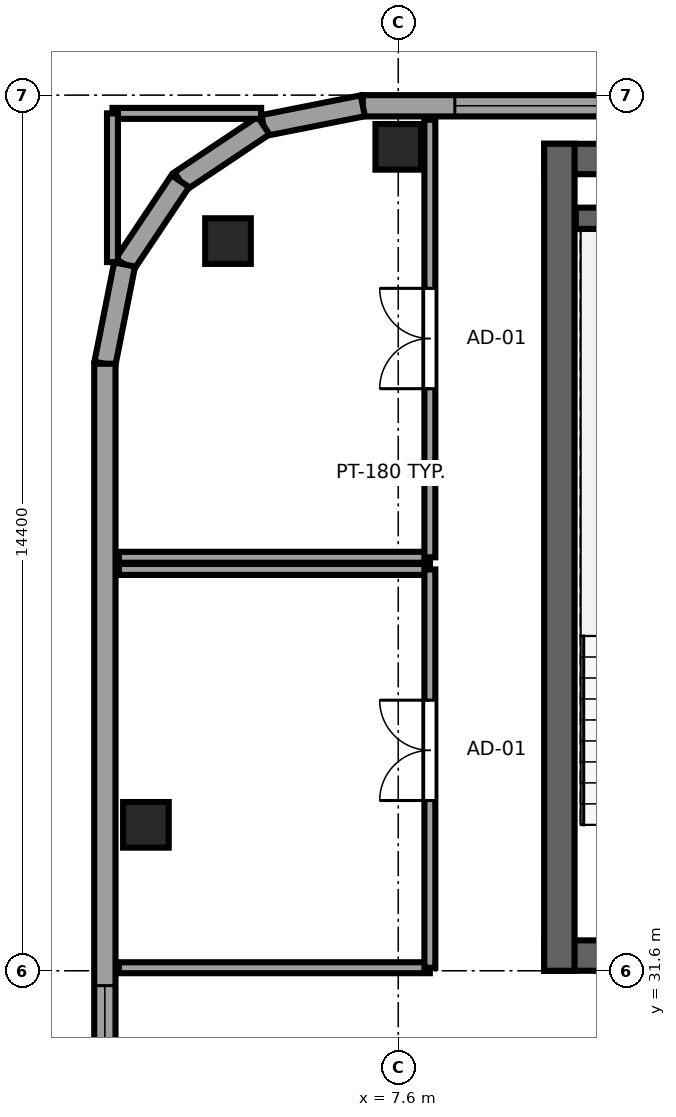
"""IFC4 building model, lengths in metres.
Left out: names, types, materials, properties, quantities, classifications, styles, units other than length and angle.
Written with IfcOpenShell. Run it as: python <this file> out.ifc"""

import sys

from ifc_helpers import new_model, si_unit, direction, frame, frame_2d, origin, origin_2d, place, context, subcontext, project, spatial, rectangle, extrude, source, transform, mapped, element, fill, save


model = new_model("IFC4")
c1 = context("Model", 3, precision=1e-05, world=origin(), true_north=direction((0.0, 1.0)))
c2 = subcontext(c1, "Body", "Model", "MODEL_VIEW")
j1 = project(units=[si_unit("LENGTHUNIT", "METRE"), si_unit("PLANEANGLEUNIT", "RADIAN")], contexts=[c1])
p1 = place(None, origin())
s1 = spatial("IfcSite", under=j1, at=p1, CompositionType="ELEMENT")
p2 = place(p1, origin())
s2 = spatial("IfcBuilding", under=s1, at=p2, CompositionType="ELEMENT")
p3 = place(p2, frame((0.0, 0.0, 216.8)))
s3 = spatial("IfcBuildingStorey", under=s2, at=p3, CompositionType="ELEMENT", Elevation=216.8)
p4 = place(p3, frame((10.0, 31.85, 0.0), z_axis=(0.0, 0.0, 1.0), x_axis=(1.0, 0.0, 0.0)))
e1 = element("IfcWall", 1, at=p4, inside=s3, PredefinedType="SHEAR", context=c2, shape_type="SweptSolid", body=[
    extrude(rectangle(XDim=26.0, YDim=0.5, at=frame_2d((13.0, 0.0))), origin(), (0.0, 0.0, 1.0), 3.55),
])
p5 = place(p4, frame((7.45, 0.0, 0.0), z_axis=(0.0, 0.0, 1.0), x_axis=(-1.0, 0.0, 0.0)))
e2 = element("IfcOpeningElement", 2, at=p5, cuts=e1, PredefinedType="OPENING", context=c2, shape_type="SweptSolid", body=[
    extrude(rectangle(XDim=1.5, YDim=2.04, at=frame_2d((0.75, 1.02))), frame((0.0, 0.26, 0.0), z_axis=(0.0, -1.0, 0.0), x_axis=(1.0, 0.0, 0.0)), (0.0, 0.0, 1.0), 0.52),
])
p6 = place(p4, frame((13.75, 0.0, 0.0), z_axis=(0.0, 0.0, 1.0), x_axis=(-1.0, 0.0, 0.0)))
e3 = element("IfcOpeningElement", 3, at=p6, cuts=e1, PredefinedType="OPENING", context=c2, shape_type="SweptSolid", body=[
    extrude(rectangle(XDim=1.5, YDim=2.04, at=frame_2d((0.75, 1.02))), frame((0.0, 0.26, 0.0), z_axis=(0.0, -1.0, 0.0), x_axis=(1.0, 0.0, 0.0)), (0.0, 0.0, 1.0), 0.52),
])
p7 = place(p4, frame((20.05, 0.0, 0.0), z_axis=(0.0, 0.0, 1.0), x_axis=(-1.0, 0.0, 0.0)))
e4 = element("IfcOpeningElement", 4, at=p7, cuts=e1, PredefinedType="OPENING", context=c2, shape_type="SweptSolid", body=[
    extrude(rectangle(XDim=1.5, YDim=2.04, at=frame_2d((0.75, 1.02))), frame((0.0, 0.26, 0.0), z_axis=(0.0, -1.0, 0.0), x_axis=(1.0, 0.0, 0.0)), (0.0, 0.0, 1.0), 0.52),
])
p8 = place(p3, frame((10.0, 44.95, 0.0), z_axis=(0.0, 0.0, 1.0), x_axis=(1.0, 0.0, 0.0)))
e5 = element("IfcWall", 5, at=p8, inside=s3, PredefinedType="SHEAR", context=c2, shape_type="SweptSolid", body=[
    extrude(rectangle(XDim=26.0, YDim=0.5, at=frame_2d((13.0, 0.0))), origin(), (0.0, 0.0, 1.0), 3.55),
])
p9 = place(p3, frame((10.25, 31.6, 0.0), z_axis=(0.0, 0.0, 1.0), x_axis=(0.0, 1.0, 0.0)))
e6 = element("IfcWall", 6, at=p9, inside=s3, PredefinedType="SHEAR", context=c2, shape_type="SweptSolid", body=[
    extrude(rectangle(XDim=13.6, YDim=0.5, at=frame_2d((6.8, 0.0))), origin(), (0.0, 0.0, 1.0), 3.55),
])
p10 = place(p3, frame((10.52, 43.975, 0.0), z_axis=(0.0, 0.0, 1.0), x_axis=(1.0, 0.0, 0.0)))
e7 = element("IfcWall", 7, at=p10, inside=s3, PredefinedType="SHEAR", context=c2, shape_type="SweptSolid", body=[
    extrude(rectangle(XDim=3.6, YDim=0.35, at=frame_2d((1.8, 0.0))), origin(), (0.0, 0.0, 1.0), 3.55),
])
m1 = source(origin(), c2, "Body", "SweptSolid", [
    extrude(rectangle(XDim=0.75, YDim=0.75, at=origin_2d()), origin(), (0.0, 0.0, 1.0), 3.55),
])
for number, where, z_axis, x_axis in (
    (8, (4.8, 43.6, 0.0), (0.0, 0.0, 1.0), (1.0, 0.0, 0.0)),
    (9, (7.6, 45.15, 0.0), (0.0, 0.0, 1.0), (1.0, 0.0, 0.0)),
    (10, (3.45, 34.0, 0.0), (0.0, 0.0, 1.0), (1.0, 0.0, 0.0)),
):
    element("IfcColumn", number, at=place(p3, frame(where, z_axis=z_axis, x_axis=x_axis)), inside=s3, PredefinedType="COLUMN", context=c2, shape_type="MappedRepresentation", body=[
        mapped(m1, transform((0.0, 0.0, 0.0), x_axis=(1.0, 0.0, 0.0), y_axis=(0.0, 1.0, 0.0), z_axis=(0.0, 0.0, 1.0), scale=1.0)),
    ])
p11 = place(p3, frame((35.383, 45.825, 0.0), z_axis=(0.0, 0.0, 1.0), x_axis=(-1.0, 0.0, 0.0)))
e11 = element("IfcWall", 11, at=p11, inside=s3, PredefinedType="SOLIDWALL", context=c2, shape_type="SweptSolid", body=[
    extrude(rectangle(XDim=28.366, YDim=0.35, at=frame_2d((14.183, 0.0))), origin(), (0.0, 0.0, 1.0), 3.37),
])
p12 = place(p11, frame((1.514, 0.0, 0.68)))
e12 = element("IfcOpeningElement", 12, at=p12, cuts=e11, PredefinedType="OPENING", context=c2, shape_type="SweptSolid", body=[
    extrude(rectangle(XDim=2.7, YDim=1.95, at=frame_2d((1.35, 0.975))), frame((0.0, 0.185, 0.0), z_axis=(0.0, -1.0, 0.0), x_axis=(1.0, 0.0, 0.0)), (0.0, 0.0, 1.0), 0.37),
])
p13 = place(p11, frame((6.041, 0.0, 0.68)))
e13 = element("IfcOpeningElement", 13, at=p13, cuts=e11, PredefinedType="OPENING", context=c2, shape_type="SweptSolid", body=[
    extrude(rectangle(XDim=2.7, YDim=1.95, at=frame_2d((1.35, 0.975))), frame((0.0, 0.185, 0.0), z_axis=(0.0, -1.0, 0.0), x_axis=(1.0, 0.0, 0.0)), (0.0, 0.0, 1.0), 0.37),
])
p14 = place(p11, frame((10.569, 0.0, 0.68)))
e14 = element("IfcOpeningElement", 14, at=p14, cuts=e11, PredefinedType="OPENING", context=c2, shape_type="SweptSolid", body=[
    extrude(rectangle(XDim=2.7, YDim=1.95, at=frame_2d((1.35, 0.975))), frame((0.0, 0.185, 0.0), z_axis=(0.0, -1.0, 0.0), x_axis=(1.0, 0.0, 0.0)), (0.0, 0.0, 1.0), 0.37),
])
p15 = place(p11, frame((15.097, 0.0, 0.68)))
e15 = element("IfcOpeningElement", 15, at=p15, cuts=e11, PredefinedType="OPENING", context=c2, shape_type="SweptSolid", body=[
    extrude(rectangle(XDim=2.7, YDim=1.95, at=frame_2d((1.35, 0.975))), frame((0.0, 0.185, 0.0), z_axis=(0.0, -1.0, 0.0), x_axis=(1.0, 0.0, 0.0)), (0.0, 0.0, 1.0), 0.37),
])
p16 = place(p11, frame((19.624, 0.0, 0.68)))
e16 = element("IfcOpeningElement", 16, at=p16, cuts=e11, PredefinedType="OPENING", context=c2, shape_type="SweptSolid", body=[
    extrude(rectangle(XDim=2.7, YDim=1.95, at=frame_2d((1.35, 0.975))), frame((0.0, 0.185, 0.0), z_axis=(0.0, -1.0, 0.0), x_axis=(1.0, 0.0, 0.0)), (0.0, 0.0, 1.0), 0.37),
])
p17 = place(p11, frame((24.152, 0.0, 0.68)))
e17 = element("IfcOpeningElement", 17, at=p17, cuts=e11, PredefinedType="OPENING", context=c2, shape_type="SweptSolid", body=[
    extrude(rectangle(XDim=2.7, YDim=1.95, at=frame_2d((1.35, 0.975))), frame((0.0, 0.185, 0.0), z_axis=(0.0, -1.0, 0.0), x_axis=(1.0, 0.0, 0.0)), (0.0, 0.0, 1.0), 0.37),
])
p18 = place(p3, frame((7.017, 45.825, 0.0), z_axis=(0.0, 0.0, 1.0), x_axis=(-0.980788844421, -0.195072403631, 0.0)))
e18 = element("IfcWall", 18, at=p18, inside=s3, PredefinedType="SOLIDWALL", context=c2, shape_type="SweptSolid", body=[
    extrude(rectangle(XDim=1.665, YDim=0.35, at=frame_2d((0.832, 0.0))), origin(), (0.0, 0.0, 1.0), 3.37),
])
for number, where, z_axis, x_axis in (
    (19, (5.385, 45.5, 0.0), (0.0, 0.0, 1.0), (-0.832, -0.556, 0.0)),
    (20, (4.015, 44.585, 0.0), (0.0, 0.0, 1.0), (-0.556, -0.831, 0.0)),
):
    element("IfcWall", number, at=place(p3, frame(where, z_axis=z_axis, x_axis=x_axis)), inside=s3, PredefinedType="SOLIDWALL", context=c2, shape_type="SweptSolid", body=[
        extrude(rectangle(XDim=1.647, YDim=0.35, at=frame_2d((0.824, 0.0))), origin(), (0.0, 0.0, 1.0), 2.9),
    ])
p19 = place(p3, frame((3.1, 43.216, 0.0), z_axis=(0.0, 0.0, 1.0), x_axis=(-0.195044345786, -0.980794424524, 0.0)))
e21 = element("IfcWall", 21, at=p19, inside=s3, PredefinedType="SOLIDWALL", context=c2, shape_type="SweptSolid", body=[
    extrude(rectangle(XDim=1.665, YDim=0.35, at=frame_2d((0.833, 0.0))), origin(), (0.0, 0.0, 1.0), 3.37),
])
p20 = place(p3, frame((2.775, 41.583, 0.0), z_axis=(0.0, 0.0, 1.0), x_axis=(0.0, -1.0, 0.0)))
e22 = element("IfcWall", 22, at=p20, inside=s3, PredefinedType="SOLIDWALL", context=c2, shape_type="SweptSolid", body=[
    extrude(rectangle(XDim=34.566, YDim=0.35, at=frame_2d((17.283, 0.0))), origin(), (0.0, 0.0, 1.0), 3.37),
])
p21 = place(p20, frame((10.227, 0.0, 0.68)))
e23 = element("IfcOpeningElement", 23, at=p21, cuts=e22, PredefinedType="OPENING", context=c2, shape_type="SweptSolid", body=[
    extrude(rectangle(XDim=2.7, YDim=1.95, at=frame_2d((1.35, 0.975))), frame((0.0, 0.185, 0.0), z_axis=(0.0, -1.0, 0.0), x_axis=(1.0, 0.0, 0.0)), (0.0, 0.0, 1.0), 0.37),
])
p22 = place(p20, frame((22.189, 0.0, 0.68)))
e24 = element("IfcOpeningElement", 24, at=p22, cuts=e22, PredefinedType="OPENING", context=c2, shape_type="SweptSolid", body=[
    extrude(rectangle(XDim=2.7, YDim=1.95, at=frame_2d((1.35, 0.975))), frame((0.0, 0.185, 0.0), z_axis=(0.0, -1.0, 0.0), x_axis=(1.0, 0.0, 0.0)), (0.0, 0.0, 1.0), 0.37),
])
p23 = place(p20, frame((26.36, 0.0, 0.68)))
e25 = element("IfcOpeningElement", 25, at=p23, cuts=e22, PredefinedType="OPENING", context=c2, shape_type="SweptSolid", body=[
    extrude(rectangle(XDim=2.7, YDim=1.95, at=frame_2d((1.35, 0.975))), frame((0.0, 0.185, 0.0), z_axis=(0.0, -1.0, 0.0), x_axis=(1.0, 0.0, 0.0)), (0.0, 0.0, 1.0), 0.37),
])
p24 = place(p20, frame((29.48, 0.0, 0.68)))
e26 = element("IfcOpeningElement", 26, at=p24, cuts=e22, PredefinedType="OPENING", context=c2, shape_type="SweptSolid", body=[
    extrude(rectangle(XDim=2.7, YDim=1.95, at=frame_2d((1.35, 0.975))), frame((0.0, 0.185, 0.0), z_axis=(0.0, -1.0, 0.0), x_axis=(1.0, 0.0, 0.0)), (0.0, 0.0, 1.0), 0.37),
])
p25 = place(p20, frame((16.683, 0.0, 0.62)))
e27 = element("IfcOpeningElement", 27, at=p25, cuts=e22, PredefinedType="OPENING", context=c2, shape_type="SweptSolid", body=[
    extrude(rectangle(XDim=1.5, YDim=1.55, at=frame_2d((0.75, 0.775))), frame((0.0, 0.185, 0.0), z_axis=(0.0, -1.0, 0.0), x_axis=(1.0, 0.0, 0.0)), (0.0, 0.0, 1.0), 0.37),
])
for number, where, z_axis, x_axis in (
    (28, (3.005, 31.65, 0.0), (0.0, 0.0, 1.0), (1.0, 0.0, 0.0)),
    (29, (3.005, 38.2, 0.0), (0.0, 0.0, 1.0), (1.0, 0.0, 0.0)),
):
    element("IfcWall", number, at=place(p3, frame(where, z_axis=z_axis, x_axis=x_axis)), inside=s3, PredefinedType="PARTITIONING", context=c2, shape_type="SweptSolid", body=[
        extrude(rectangle(XDim=5.115, YDim=0.18, at=frame_2d((2.558, 0.0))), origin(), (0.0, 0.0, 1.0), 3.37),
    ])
p26 = place(p3, frame((8.12, 31.65, 0.0), z_axis=(0.0, 0.0, 1.0), x_axis=(0.0, 1.0, 0.0)))
e30 = element("IfcWall", 30, at=p26, inside=s3, PredefinedType="PARTITIONING", context=c2, shape_type="SweptSolid", body=[
    extrude(rectangle(XDim=6.55, YDim=0.18, at=frame_2d((3.275, 0.0))), origin(), (0.0, 0.0, 1.0), 3.37),
])
p27 = place(p26, frame((2.75, 0.0, 0.0)))
e31 = element("IfcOpeningElement", 31, at=p27, cuts=e30, PredefinedType="OPENING", context=c2, shape_type="SweptSolid", body=[
    extrude(rectangle(XDim=1.65, YDim=2.15, at=frame_2d((0.825, 1.075))), frame((0.0, 0.1, 0.0), z_axis=(0.0, -1.0, 0.0), x_axis=(1.0, 0.0, 0.0)), (0.0, 0.0, 1.0), 0.2),
])
p28 = place(p3, frame((3.005, 38.4, 0.0), z_axis=(0.0, 0.0, 1.0), x_axis=(1.0, 0.0, 0.0)))
e32 = element("IfcWall", 32, at=p28, inside=s3, PredefinedType="PARTITIONING", context=c2, shape_type="SweptSolid", body=[
    extrude(rectangle(XDim=5.115, YDim=0.18, at=frame_2d((2.558, 0.0))), origin(), (0.0, 0.0, 1.0), 3.37),
])
for number, where, z_axis, x_axis in (
    (33, (2.9, 45.7, 0.0), (0.0, 0.0, 1.0), (1.0, 0.0, 0.0)),
    (34, (2.9, 43.255, 0.0), (0.0, 0.0, 1.0), (0.0, 1.0, 0.0)),
):
    element("IfcWall", number, at=place(p3, frame(where, z_axis=z_axis, x_axis=x_axis)), inside=s3, PredefinedType="PARTITIONING", context=c2, shape_type="SweptSolid", body=[
        extrude(rectangle(XDim=2.445, YDim=0.18, at=frame_2d((1.223, 0.0))), origin(), (0.0, 0.0, 1.0), 3.37),
    ])
p29 = place(p3, frame((8.12, 38.4, 0.0), z_axis=(0.0, 0.0, 1.0), x_axis=(0.0, 1.0, 0.0)))
e35 = element("IfcWall", 35, at=p29, inside=s3, PredefinedType="PARTITIONING", context=c2, shape_type="SweptSolid", body=[
    extrude(rectangle(XDim=7.195, YDim=0.18, at=frame_2d((3.598, 0.0))), origin(), (0.0, 0.0, 1.0), 3.37),
])
p30 = place(p29, frame((2.772, 0.0, 0.0)))
e36 = element("IfcOpeningElement", 36, at=p30, cuts=e35, PredefinedType="OPENING", context=c2, shape_type="SweptSolid", body=[
    extrude(rectangle(XDim=1.65, YDim=2.15, at=frame_2d((0.825, 1.075))), frame((0.0, 0.1, 0.0), z_axis=(0.0, -1.0, 0.0), x_axis=(1.0, 0.0, 0.0)), (0.0, 0.0, 1.0), 0.2),
])
m2 = source(origin(), c2, "Body", "SweptSolid", [
    extrude(rectangle(XDim=2.7, YDim=1.95, at=frame_2d((1.35, 0.975))), frame((0.0, 0.09, 0.0), z_axis=(0.0, -1.0, 0.0), x_axis=(1.0, 0.0, 0.0)), (0.0, 0.0, 1.0), 0.06),
])
p31 = place(p17, origin())
e37 = element("IfcWindow", 37, at=p31, inside=s3, PartitioningType="TRIPLE_PANEL_HORIZONTAL", PredefinedType="WINDOW", context=c2, shape_type="MappedRepresentation", body=[
    mapped(m2, transform((0.0, 0.0, 0.0), x_axis=(1.0, 0.0, 0.0), y_axis=(0.0, 1.0, 0.0), z_axis=(0.0, 0.0, 1.0), scale=1.0)),
])
fill(e17, e37)
p32 = place(p21, origin())
e38 = element("IfcWindow", 38, at=p32, inside=s3, PartitioningType="TRIPLE_PANEL_HORIZONTAL", PredefinedType="WINDOW", context=c2, shape_type="MappedRepresentation", body=[
    mapped(m2, transform((0.0, 0.0, 0.0), x_axis=(1.0, 0.0, 0.0), y_axis=(0.0, 1.0, 0.0), z_axis=(0.0, 0.0, 1.0), scale=1.0)),
])
fill(e23, e38)
m3 = source(origin(), c2, "Body", "SweptSolid", [
    extrude(rectangle(XDim=1.65, YDim=2.15, at=frame_2d((0.825, 1.075))), frame((0.0, 0.025, 0.0), z_axis=(0.0, -1.0, 0.0), x_axis=(1.0, 0.0, 0.0)), (0.0, 0.0, 1.0), 0.05),
])
p33 = place(p27, origin())
e39 = element("IfcDoor", 39, at=p33, inside=s3, OperationType="DOUBLE_DOOR_SINGLE_SWING", PredefinedType="DOOR", context=c2, shape_type="MappedRepresentation", body=[
    mapped(m3, transform((0.0, 0.0, 0.0), x_axis=(1.0, 0.0, 0.0), y_axis=(0.0, 1.0, 0.0), z_axis=(0.0, 0.0, 1.0), scale=1.0)),
])
fill(e31, e39)
p34 = place(p30, origin())
e40 = element("IfcDoor", 40, at=p34, inside=s3, OperationType="DOUBLE_DOOR_SINGLE_SWING", PredefinedType="DOOR", context=c2, shape_type="MappedRepresentation", body=[
    mapped(m3, transform((0.0, 0.0, 0.0), x_axis=(1.0, 0.0, 0.0), y_axis=(0.0, 1.0, 0.0), z_axis=(0.0, 0.0, 1.0), scale=1.0)),
])
fill(e36, e40)
save(model, sys.argv[1])
